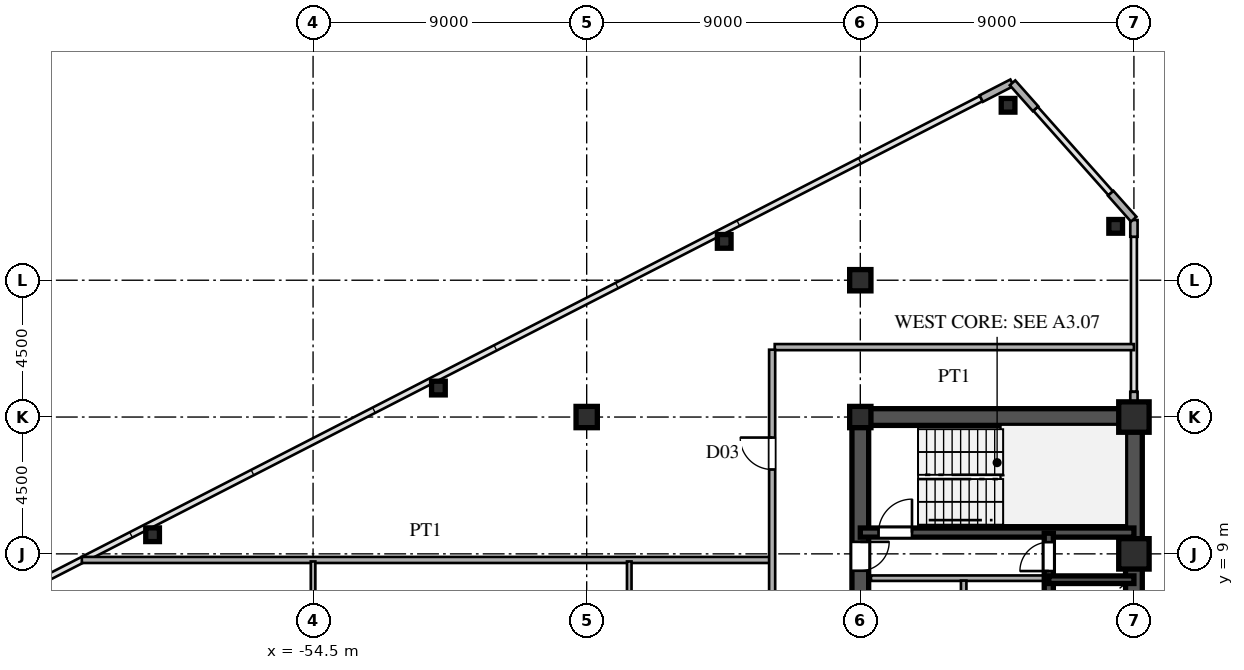
"""IFC4 building model, lengths in metres.
Left out: names, types, materials, properties, quantities, classifications, styles, units other than length and angle.
Written with IfcOpenShell. Run it as: python <this file> out.ifc"""

import sys

from ifc_helpers import new_model, si_unit, direction, frame, frame_2d, origin, origin_2d, place, context, subcontext, project, spatial, rectangle, hollow_rectangle, i_section, extrude, source, transform, mapped, element, fill, save


model = new_model("IFC4")
c1 = context("Model", 3, precision=1e-05, world=origin(), true_north=direction((0.0, 1.0)))
c2 = subcontext(c1, "Body", "Model", "MODEL_VIEW")
j1 = project(units=[si_unit("LENGTHUNIT", "METRE"), si_unit("PLANEANGLEUNIT", "RADIAN")], contexts=[c1])
p1 = place(None, origin())
s1 = spatial("IfcSite", under=j1, at=p1, CompositionType="ELEMENT")
p2 = place(p1, origin())
s2 = spatial("IfcBuilding", under=s1, at=p2, CompositionType="ELEMENT")
p3 = place(p2, frame((0.0, 0.0, 151.2)))
s3 = spatial("IfcBuildingStorey", under=s2, at=p3, CompositionType="ELEMENT", Elevation=151.2)
m1 = source(origin(), c2, "Body", "SweptSolid", [
    extrude(hollow_rectangle(XDim=1.0, YDim=1.0, WallThickness=0.042, at=origin_2d()), origin(), (0.0, 0.0, 1.0), 3.6),
])
for number, where, z_axis, x_axis in (
    (1, (-27.5, 9.0, 0.0), (0.0, 0.0, 1.0), (1.0, 0.0, 0.0)),
    (2, (-27.5, 13.5, 0.0), (0.0, 0.0, 1.0), (1.0, 0.0, 0.0)),
):
    element("IfcColumn", number, at=place(p3, frame(where, z_axis=z_axis, x_axis=x_axis)), inside=s3, PredefinedType="COLUMN", context=c2, shape_type="MappedRepresentation", body=[
        mapped(m1, transform((0.0, 0.0, 0.0), scale=1.0)),
    ])
m2 = source(origin(), c2, "Body", "SweptSolid", [
    extrude(i_section(OverallWidth=0.7, OverallDepth=0.7, WebThickness=0.028, FlangeThickness=0.045, at=origin_2d()), origin(), (0.0, 0.0, 1.0), 3.6),
])
for number, where, z_axis, x_axis in (
    (3, (-36.5, 13.5, 0.0), (0.0, 0.0, 1.0), (1.0, 0.0, 0.0)),
    (4, (-36.5, 18.0, 0.0), (0.0, 0.0, 1.0), (1.0, 0.0, 0.0)),
    (5, (-45.5, 13.5, 0.0), (0.0, 0.0, 1.0), (1.0, 0.0, 0.0)),
):
    element("IfcColumn", number, at=place(p3, frame(where, z_axis=z_axis, x_axis=x_axis)), inside=s3, PredefinedType="COLUMN", context=c2, shape_type="MappedRepresentation", body=[
        mapped(m2, transform((0.0, 0.0, 0.0), scale=1.0)),
    ])
m3 = source(origin(), c2, "Body", "SweptSolid", [
    extrude(hollow_rectangle(XDim=0.45, YDim=0.45, WallThickness=0.018, at=origin_2d()), origin(), (0.0, 0.0, 1.0), 3.6),
])
for number, where, z_axis, x_axis in (
    (6, (-28.1, 19.772, 0.0), (0.0, 0.0, 1.0), (1.0, 0.0, 0.0)),
    (7, (-31.64, 23.754, 0.0), (0.0, 0.0, 1.0), (1.0, 0.0, 0.0)),
    (8, (-40.976, 19.278, 0.0), (0.0, 0.0, 1.0), (1.0, 0.0, 0.0)),
    (9, (-50.377, 14.453, 0.0), (0.0, 0.0, 1.0), (1.0, 0.0, 0.0)),
    (10, (-59.779, 9.629, 0.0), (0.0, 0.0, 1.0), (1.0, 0.0, 0.0)),
):
    element("IfcColumn", number, at=place(p3, frame(where, z_axis=z_axis, x_axis=x_axis)), inside=s3, PredefinedType="COLUMN", context=c2, shape_type="MappedRepresentation", body=[
        mapped(m3, transform((0.0, 0.0, 0.0), scale=1.0)),
    ])
p4 = place(p3, frame((-27.5, 13.78, 0.0), z_axis=(0.0, 0.0, 1.0), x_axis=(0.0, 1.0, 0.0)))
e11 = element("IfcWall", 11, at=p4, inside=s3, PredefinedType="SOLIDWALL", context=c2, shape_type="SweptSolid", body=[
    extrude(rectangle(XDim=0.55, YDim=0.24, at=frame_2d((0.275, 0.0))), origin(), (0.0, 0.0, 1.0), 2.88),
])
p5 = place(p3, frame((-27.5, 19.43, 0.0), z_axis=(0.0, 0.0, 1.0), x_axis=(0.0, 1.0, 0.0)))
e12 = element("IfcWall", 12, at=p5, inside=s3, PredefinedType="SOLIDWALL", context=c2, shape_type="SweptSolid", body=[
    extrude(rectangle(XDim=0.55, YDim=0.24, at=frame_2d((0.275, 0.0))), origin(), (0.0, 0.0, 1.0), 3.38),
])
for number, where, z_axis, x_axis in (
    (13, (-27.507, 20.008, 0.0), (0.0, 0.0, 1.0), (-0.664, 0.747, 0.0)),
    (14, (-30.736, 23.64, 0.0), (0.0, 0.0, 1.0), (-0.664, 0.747, 0.0)),
):
    element("IfcWall", number, at=place(p3, frame(where, z_axis=z_axis, x_axis=x_axis)), inside=s3, PredefinedType="SOLIDWALL", context=c2, shape_type="SweptSolid", body=[
        extrude(rectangle(XDim=1.14, YDim=0.24, at=frame_2d((0.57, 0.0))), origin(), (0.0, 0.0, 1.0), 3.38),
    ])
p6 = place(p3, frame((-31.509, 24.495, 0.0), z_axis=(0.0, 0.0, 1.0), x_axis=(-0.889797395748, -0.456355776255, 0.0)))
e15 = element("IfcWall", 15, at=p6, inside=s3, PredefinedType="SOLIDWALL", context=c2, shape_type="SweptSolid", body=[
    extrude(rectangle(XDim=1.14, YDim=0.24, at=frame_2d((0.57, 0.0))), origin(), (0.0, 0.0, 1.0), 3.38),
])
p7 = place(p3, frame((-27.5, 1.3, 0.0), z_axis=(0.0, 0.0, 1.0), x_axis=(0.0, 1.0, 0.0)))
e16 = element("IfcWall", 16, at=p7, inside=s3, PredefinedType="SHEAR", context=c2, shape_type="SweptSolid", body=[
    extrude(rectangle(XDim=12.2, YDim=0.55, at=frame_2d((6.1, 0.0))), origin(), (0.0, 0.0, 1.0), 3.38),
])
p8 = place(p3, frame((-36.5, 13.5, 0.0), z_axis=(0.0, 0.0, 1.0), x_axis=(1.0, 0.0, 0.0)))
e17 = element("IfcWall", 17, at=p8, inside=s3, PredefinedType="SHEAR", context=c2, shape_type="SweptSolid", body=[
    extrude(rectangle(XDim=9.0, YDim=0.55, at=frame_2d((4.5, 0.0))), origin(), (0.0, 0.0, 1.0), 3.38),
])
p9 = place(p3, frame((-36.5, 8.2, 0.0), z_axis=(0.0, 0.0, 1.0), x_axis=(0.0, 1.0, 0.0)))
e18 = element("IfcWall", 18, at=p9, inside=s3, PredefinedType="SHEAR", context=c2, shape_type="SweptSolid", body=[
    extrude(rectangle(XDim=5.45, YDim=0.55, at=frame_2d((2.725, 0.0))), origin(), (0.0, 0.0, 1.0), 3.38),
])
p10 = place(p9, frame((0.245, 0.0, 0.0)))
e19 = element("IfcOpeningElement", 19, at=p10, cuts=e18, PredefinedType="OPENING", context=c2, shape_type="SweptSolid", body=[
    extrude(rectangle(XDim=0.95, YDim=2.15, at=frame_2d((0.475, 1.075))), frame((0.0, 0.285, 0.0), z_axis=(0.0, -1.0, 0.0), x_axis=(1.0, 0.0, 0.0)), (0.0, 0.0, 1.0), 0.57),
])
p11 = place(p3, frame((-36.5, 4.75, 0.0), z_axis=(0.0, 0.0, 1.0), x_axis=(0.0, 1.0, 0.0)))
e20 = element("IfcWall", 20, at=p11, inside=s3, PredefinedType="SHEAR", context=c2, shape_type="SweptSolid", body=[
    extrude(rectangle(XDim=3.45, YDim=0.55, at=frame_2d((1.725, 0.0))), origin(), (0.0, 0.0, 1.0), 3.38),
])
p12 = place(p11, frame((1.25, 0.0, 0.0)))
e21 = element("IfcOpeningElement", 21, at=p12, cuts=e20, PredefinedType="OPENING", context=c2, shape_type="SweptSolid", body=[
    extrude(rectangle(XDim=0.95, YDim=2.15, at=frame_2d((0.475, 1.075))), frame((0.0, 0.285, 0.0), z_axis=(0.0, -1.0, 0.0), x_axis=(1.0, 0.0, 0.0)), (0.0, 0.0, 1.0), 0.57),
])
p13 = place(p3, frame((-36.5, 9.7, 0.0), z_axis=(0.0, 0.0, 1.0), x_axis=(1.0, 0.0, 0.0)))
e22 = element("IfcWall", 22, at=p13, inside=s3, PredefinedType="SHEAR", context=c2, shape_type="SweptSolid", body=[
    extrude(rectangle(XDim=9.0, YDim=0.3, at=frame_2d((4.5, 0.0))), origin(), (0.0, 0.0, 1.0), 3.38),
])
p14 = place(p13, frame((0.6, 0.0, 0.0)))
e23 = element("IfcOpeningElement", 23, at=p14, cuts=e22, PredefinedType="OPENING", context=c2, shape_type="SweptSolid", body=[
    extrude(rectangle(XDim=1.1, YDim=2.2, at=frame_2d((0.55, 1.1))), frame((0.0, 0.16, 0.0), z_axis=(0.0, -1.0, 0.0), x_axis=(1.0, 0.0, 0.0)), (0.0, 0.0, 1.0), 0.32),
])
p15 = place(p3, frame((-30.3, 8.15, 0.0), z_axis=(0.0, 0.0, 1.0), x_axis=(1.0, 0.0, 0.0)))
e24 = element("IfcWall", 24, at=p15, inside=s3, PredefinedType="SHEAR", context=c2, shape_type="SweptSolid", body=[
    extrude(rectangle(XDim=2.8, YDim=0.25, at=frame_2d((1.4, 0.0))), origin(), (0.0, 0.0, 1.0), 3.38),
])
p16 = place(p3, frame((-30.3, 5.9, 0.0), z_axis=(0.0, 0.0, 1.0), x_axis=(0.0, 1.0, 0.0)))
e25 = element("IfcWall", 25, at=p16, inside=s3, PredefinedType="SHEAR", context=c2, shape_type="SweptSolid", body=[
    extrude(rectangle(XDim=2.25, YDim=0.3, at=frame_2d((1.125, 0.0))), origin(), (0.0, 0.0, 1.0), 3.38),
])
p17 = place(p3, frame((-30.3, 8.15, 0.0), z_axis=(0.0, 0.0, 1.0), x_axis=(0.0, 1.0, 0.0)))
e26 = element("IfcWall", 26, at=p17, inside=s3, PredefinedType="SHEAR", context=c2, shape_type="SweptSolid", body=[
    extrude(rectangle(XDim=1.53, YDim=0.3, at=frame_2d((0.765, 0.0))), origin(), (0.0, 0.0, 1.0), 3.38),
])
p18 = place(p17, frame((0.285, 0.0, 0.0)))
e27 = element("IfcOpeningElement", 27, at=p18, cuts=e26, PredefinedType="OPENING", context=c2, shape_type="SweptSolid", body=[
    extrude(rectangle(XDim=0.95, YDim=2.15, at=frame_2d((0.475, 1.075))), frame((0.0, 0.16, 0.0), z_axis=(0.0, -1.0, 0.0), x_axis=(1.0, 0.0, 0.0)), (0.0, 0.0, 1.0), 0.32),
])
p19 = place(p3, frame((-36.15, 8.2, 0.0), z_axis=(0.0, 0.0, 1.0), x_axis=(1.0, 0.0, 0.0)))
e28 = element("IfcWall", 28, at=p19, inside=s3, PredefinedType="PARTITIONING", context=c2, shape_type="SweptSolid", body=[
    extrude(rectangle(XDim=5.7, YDim=0.18, at=frame_2d((2.85, 0.0))), origin(), (0.0, 0.0, 1.0), 3.38),
])
p20 = place(p3, frame((-33.1, 1.38, 0.0), z_axis=(0.0, 0.0, 1.0), x_axis=(0.0, 1.0, 0.0)))
e29 = element("IfcWall", 29, at=p20, inside=s3, PredefinedType="PARTITIONING", context=c2, shape_type="SweptSolid", body=[
    extrude(rectangle(XDim=6.74, YDim=0.18, at=frame_2d((3.37, 0.0))), origin(), (0.0, 0.0, 1.0), 3.38),
])
p21 = place(p3, frame((-62.106, 8.8, 0.0), z_axis=(0.0, 0.0, 1.0), x_axis=(1.0, 0.0, 0.0)))
e30 = element("IfcWall", 30, at=p21, inside=s3, PredefinedType="PARTITIONING", context=c2, shape_type="SweptSolid", body=[
    extrude(rectangle(XDim=22.626, YDim=0.2, at=frame_2d((11.313, 0.0))), origin(), (0.0, 0.0, 1.0), 3.38),
])
p22 = place(p3, frame((-39.315, 15.8, 0.0), z_axis=(0.0, 0.0, 1.0), x_axis=(1.0, 0.0, 0.0)))
e31 = element("IfcWall", 31, at=p22, inside=s3, PredefinedType="PARTITIONING", context=c2, shape_type="SweptSolid", body=[
    extrude(rectangle(XDim=11.815, YDim=0.2, at=frame_2d((5.907, 0.0))), origin(), (0.0, 0.0, 1.0), 3.38),
])
p23 = place(p3, frame((-54.5, -4.15, 0.0), z_axis=(0.0, 0.0, 1.0), x_axis=(0.0, 1.0, 0.0)))
e32 = element("IfcWall", 32, at=p23, inside=s3, PredefinedType="PARTITIONING", context=c2, shape_type="SweptSolid", body=[
    extrude(rectangle(XDim=12.9, YDim=0.15, at=frame_2d((6.45, 0.0))), origin(), (0.0, 0.0, 1.0), 2.78),
])
p24 = place(p23, frame((5.975, 0.0, 0.0)))
e33 = element("IfcOpeningElement", 33, at=p24, cuts=e32, PredefinedType="OPENING", context=c2, shape_type="SweptSolid", body=[
    extrude(rectangle(XDim=0.95, YDim=2.15, at=frame_2d((0.475, 1.075))), frame((0.0, 0.085, 0.0), z_axis=(0.0, -1.0, 0.0), x_axis=(1.0, 0.0, 0.0)), (0.0, 0.0, 1.0), 0.17),
])
p25 = place(p3, frame((-44.1, 4.952, 0.0), z_axis=(0.0, 0.0, 1.0), x_axis=(0.0, 1.0, 0.0)))
e34 = element("IfcWall", 34, at=p25, inside=s3, PredefinedType="PARTITIONING", context=c2, shape_type="SweptSolid", body=[
    extrude(rectangle(XDim=3.798, YDim=0.15, at=frame_2d((1.899, 0.0))), origin(), (0.0, 0.0, 1.0), 3.38),
])
p26 = place(p3, frame((-39.4, -15.715, 0.0), z_axis=(0.0, 0.0, 1.0), x_axis=(0.0, 1.0, 0.0)))
e35 = element("IfcWall", 35, at=p26, inside=s3, PredefinedType="PARTITIONING", context=c2, shape_type="SweptSolid", body=[
    extrude(rectangle(XDim=31.43, YDim=0.2, at=frame_2d((15.715, 0.0))), origin(), (0.0, 0.0, 1.0), 3.38),
])
p27 = place(p26, frame((5.19, 0.0, 0.0)))
e36 = element("IfcOpeningElement", 36, at=p27, cuts=e35, PredefinedType="OPENING", context=c2, shape_type="SweptSolid", body=[
    extrude(rectangle(XDim=1.05, YDim=2.25, at=frame_2d((0.525, 1.125))), frame((0.0, 0.11, 0.0), z_axis=(0.0, -1.0, 0.0), x_axis=(1.0, 0.0, 0.0)), (0.0, 0.0, 1.0), 0.22),
])
p28 = place(p26, frame((17.295, 0.0, 0.0)))
e37 = element("IfcOpeningElement", 37, at=p28, cuts=e35, PredefinedType="OPENING", context=c2, shape_type="SweptSolid", body=[
    extrude(rectangle(XDim=1.05, YDim=2.25, at=frame_2d((0.525, 1.125))), frame((0.0, 0.11, 0.0), z_axis=(0.0, -1.0, 0.0), x_axis=(1.0, 0.0, 0.0)), (0.0, 0.0, 1.0), 0.22),
])
p29 = place(p26, frame((27.49, 0.0, 0.0)))
e38 = element("IfcOpeningElement", 38, at=p29, cuts=e35, PredefinedType="OPENING", context=c2, shape_type="SweptSolid", body=[
    extrude(rectangle(XDim=1.05, YDim=2.25, at=frame_2d((0.525, 1.125))), frame((0.0, 0.11, 0.0), z_axis=(0.0, -1.0, 0.0), x_axis=(1.0, 0.0, 0.0)), (0.0, 0.0, 1.0), 0.22),
])
m4 = source(origin(), c2, "Body", "SweptSolid", [
    extrude(rectangle(XDim=0.95, YDim=2.15, at=frame_2d((0.475, 1.075))), frame((0.0, 0.025, 0.0), z_axis=(0.0, -1.0, 0.0), x_axis=(1.0, 0.0, 0.0)), (0.0, 0.0, 1.0), 0.05),
])
p30 = place(p10, frame((0.95, 0.0, 0.0), z_axis=(0.0, 0.0, 1.0), x_axis=(-1.0, 0.0, 0.0)))
e39 = element("IfcDoor", 39, at=p30, inside=s3, OperationType="SINGLE_SWING_RIGHT", PredefinedType="DOOR", context=c2, shape_type="MappedRepresentation", body=[
    mapped(m4, transform((0.0, 0.0, 0.0), scale=1.0)),
])
fill(e19, e39)
m5 = source(origin(), c2, "Body", "SweptSolid", [
    extrude(rectangle(XDim=1.1, YDim=2.2, at=frame_2d((0.55, 1.1))), frame((0.0, 0.025, 0.0), z_axis=(0.0, -1.0, 0.0), x_axis=(1.0, 0.0, 0.0)), (0.0, 0.0, 1.0), 0.05),
])
p31 = place(p14, origin())
e40 = element("IfcDoor", 40, at=p31, inside=s3, OperationType="SINGLE_SWING_RIGHT", PredefinedType="DOOR", context=c2, shape_type="MappedRepresentation", body=[
    mapped(m5, transform((0.0, 0.0, 0.0), scale=1.0)),
])
fill(e23, e40)
p32 = place(p18, origin())
e41 = element("IfcDoor", 41, at=p32, inside=s3, OperationType="SINGLE_SWING_LEFT", PredefinedType="DOOR", context=c2, shape_type="MappedRepresentation", body=[
    mapped(m4, transform((0.0, 0.0, 0.0), scale=1.0)),
])
fill(e27, e41)
m6 = source(origin(), c2, "Body", "SweptSolid", [
    extrude(rectangle(XDim=1.05, YDim=2.25, at=frame_2d((0.525, 1.125))), frame((0.0, 0.025, 0.0), z_axis=(0.0, -1.0, 0.0), x_axis=(1.0, 0.0, 0.0)), (0.0, 0.0, 1.0), 0.05),
])
p33 = place(p29, origin())
e42 = element("IfcDoor", 42, at=p33, inside=s3, OperationType="SINGLE_SWING_RIGHT", PredefinedType="DOOR", context=c2, shape_type="MappedRepresentation", body=[
    mapped(m6, transform((0.0, 0.0, 0.0), scale=1.0)),
])
fill(e38, e42)
save(model, sys.argv[1])
